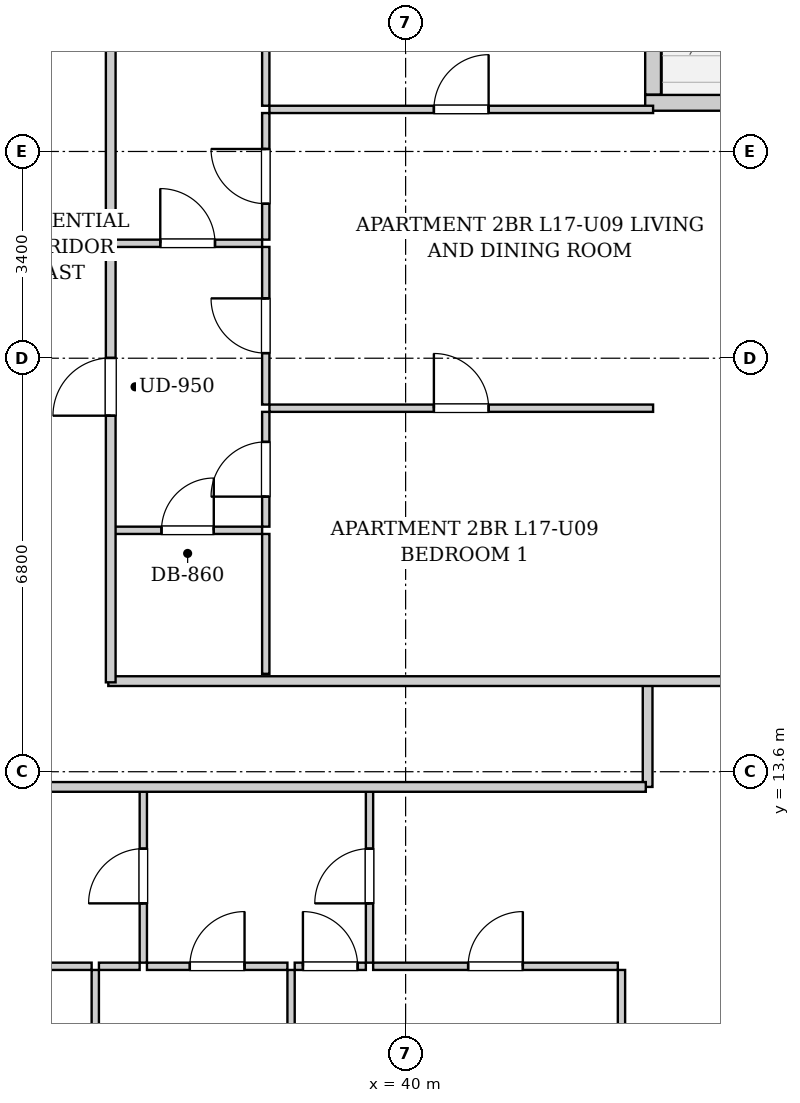
"""IFC4 building model, lengths in metres.
Left out: names, types, materials, properties, quantities, classifications, styles, units other than length and angle.
Written with IfcOpenShell. Run it as: python <this file> out.ifc"""

import sys

from ifc_helpers import new_model, si_unit, direction, frame, frame_2d, origin, place, context, subcontext, project, spatial, rectangle, extrude, element, fill, save


model = new_model("IFC4")
c1 = context("Model", 3, precision=1e-05, world=origin(), true_north=direction((0.0, 1.0)))
c2 = subcontext(c1, "Body", "Model", "MODEL_VIEW")
j1 = project(units=[si_unit("LENGTHUNIT", "METRE"), si_unit("PLANEANGLEUNIT", "RADIAN")], contexts=[c1])
p1 = place(None, origin())
s1 = spatial("IfcSite", under=j1, at=p1, CompositionType="ELEMENT")
p2 = place(p1, origin())
s2 = spatial("IfcBuilding", under=s1, at=p2, CompositionType="ELEMENT")
p3 = place(p2, frame((0.0, 0.0, 64.2)))
s3 = spatial("IfcBuildingStorey", under=s2, at=p3, CompositionType="ELEMENT", Elevation=64.2)
p4 = place(p3, frame((44.07, 28.066, 0.0), z_axis=(0.0, 0.0, 1.0), x_axis=(0.0, -1.0, 0.0)))
e1 = element("IfcWall", 1, at=p4, inside=s3, PredefinedType="SOLIDWALL", context=c2, shape_type="SweptSolid", body=[
    extrude(rectangle(XDim=3.332, YDim=0.26, at=frame_2d((1.666, 0.0))), origin(), (0.0, 0.0, 1.0), 2.94),
])
p5 = place(p4, frame((1.116, 0.0, 0.0)))
e2 = element("IfcOpeningElement", 2, at=p5, cuts=e1, PredefinedType="OPENING", context=c2, shape_type="SweptSolid", body=[
    extrude(rectangle(XDim=1.1, YDim=2.0, at=frame_2d((0.55, 1.0))), frame((0.0, 0.14, 0.0), z_axis=(0.0, -1.0, 0.0), x_axis=(1.0, 0.0, 0.0)), (0.0, 0.0, 1.0), 0.28),
])
p6 = place(p4, frame((0.276, 0.0, 0.55)))
e3 = element("IfcOpeningElement", 3, at=p6, cuts=e1, PredefinedType="OPENING", context=c2, shape_type="SweptSolid", body=[
    extrude(rectangle(XDim=0.68, YDim=1.2, at=frame_2d((0.34, 0.6))), frame((0.0, 0.14, 0.0), z_axis=(0.0, -1.0, 0.0), x_axis=(1.0, 0.0, 0.0)), (0.0, 0.0, 1.0), 0.28),
])
p7 = place(p3, frame((43.94, 24.6, 0.0), z_axis=(0.0, 0.0, 1.0), x_axis=(1.0, 0.0, 0.0)))
e4 = element("IfcWall", 4, at=p7, inside=s3, PredefinedType="SOLIDWALL", context=c2, shape_type="SweptSolid", body=[
    extrude(rectangle(XDim=2.4, YDim=0.26, at=frame_2d((1.2, 0.0))), origin(), (0.0, 0.0, 1.0), 2.94),
])
p8 = place(p3, frame((43.98, 13.35, 0.0), z_axis=(0.0, 0.0, 1.0), x_axis=(0.0, 1.0, 0.0)))
e5 = element("IfcWall", 5, at=p8, inside=s3, PredefinedType="PARTITIONING", context=c2, shape_type="SweptSolid", body=[
    extrude(rectangle(XDim=1.74, YDim=0.16, at=frame_2d((0.87, 0.0))), origin(), (0.0, 0.0, 1.0), 2.94),
])
p9 = place(p3, frame((35.11, 15.09, 0.0), z_axis=(0.0, 0.0, 1.0), x_axis=(1.0, 0.0, 0.0)))
e6 = element("IfcWall", 6, at=p9, inside=s3, PredefinedType="PARTITIONING", context=c2, shape_type="SweptSolid", body=[
    extrude(rectangle(XDim=11.11, YDim=0.16, at=frame_2d((5.555, 0.0))), origin(), (0.0, 0.0, 1.0), 2.232),
])
p10 = place(p3, frame((35.686, 10.46, 0.0), z_axis=(0.0, 0.0, 1.0), x_axis=(0.0, 1.0, 0.0)))
e7 = element("IfcWall", 7, at=p10, inside=s3, PredefinedType="PARTITIONING", context=c2, shape_type="SweptSolid", body=[
    extrude(rectangle(XDim=2.85, YDim=0.12, at=frame_2d((1.425, 0.0))), origin(), (0.0, 0.0, 1.0), 2.94),
])
p11 = place(p10, frame((0.975, 0.0, 0.0)))
e8 = element("IfcOpeningElement", 8, at=p11, cuts=e7, PredefinedType="OPENING", context=c2, shape_type="SweptSolid", body=[
    extrude(rectangle(XDim=0.9, YDim=2.05, at=frame_2d((0.45, 1.025))), frame((0.0, 0.07, 0.0), z_axis=(0.0, -1.0, 0.0), x_axis=(1.0, 0.0, 0.0)), (0.0, 0.0, 1.0), 0.14),
])
p12 = place(p3, frame((32.476, 10.4, 0.0), z_axis=(0.0, 0.0, 1.0), x_axis=(1.0, 0.0, 0.0)))
e9 = element("IfcWall", 9, at=p12, inside=s3, PredefinedType="PARTITIONING", context=c2, shape_type="SweptSolid", body=[
    extrude(rectangle(XDim=2.36, YDim=0.12, at=frame_2d((1.18, 0.0))), origin(), (0.0, 0.0, 1.0), 2.94),
])
p13 = place(p12, frame((0.73, 0.0, 0.0)))
e10 = element("IfcOpeningElement", 10, at=p13, cuts=e9, PredefinedType="OPENING", context=c2, shape_type="SweptSolid", body=[
    extrude(rectangle(XDim=0.9, YDim=2.05, at=frame_2d((0.45, 1.025))), frame((0.0, 0.07, 0.0), z_axis=(0.0, -1.0, 0.0), x_axis=(1.0, 0.0, 0.0)), (0.0, 0.0, 1.0), 0.14),
])
p14 = place(p3, frame((34.956, 10.4, 0.0), z_axis=(0.0, 0.0, 1.0), x_axis=(1.0, 0.0, 0.0)))
e11 = element("IfcWall", 11, at=p14, inside=s3, PredefinedType="PARTITIONING", context=c2, shape_type="SweptSolid", body=[
    extrude(rectangle(XDim=0.67, YDim=0.12, at=frame_2d((0.335, 0.0))), origin(), (0.0, 0.0, 1.0), 2.94),
])
p15 = place(p3, frame((39.406, 10.46, 0.0), z_axis=(0.0, 0.0, 1.0), x_axis=(0.0, 1.0, 0.0)))
e12 = element("IfcWall", 12, at=p15, inside=s3, PredefinedType="PARTITIONING", context=c2, shape_type="SweptSolid", body=[
    extrude(rectangle(XDim=2.85, YDim=0.12, at=frame_2d((1.425, 0.0))), origin(), (0.0, 0.0, 1.0), 2.94),
])
p16 = place(p15, frame((0.975, 0.0, 0.0)))
e13 = element("IfcOpeningElement", 13, at=p16, cuts=e12, PredefinedType="OPENING", context=c2, shape_type="SweptSolid", body=[
    extrude(rectangle(XDim=0.9, YDim=2.05, at=frame_2d((0.45, 1.025))), frame((0.0, 0.07, 0.0), z_axis=(0.0, -1.0, 0.0), x_axis=(1.0, 0.0, 0.0)), (0.0, 0.0, 1.0), 0.14),
])
p17 = place(p3, frame((35.746, 10.4, 0.0), z_axis=(0.0, 0.0, 1.0), x_axis=(1.0, 0.0, 0.0)))
e14 = element("IfcWall", 14, at=p17, inside=s3, PredefinedType="PARTITIONING", context=c2, shape_type="SweptSolid", body=[
    extrude(rectangle(XDim=2.31, YDim=0.12, at=frame_2d((1.155, 0.0))), origin(), (0.0, 0.0, 1.0), 2.94),
])
p18 = place(p17, frame((0.705, 0.0, 0.0)))
e15 = element("IfcOpeningElement", 15, at=p18, cuts=e14, PredefinedType="OPENING", context=c2, shape_type="SweptSolid", body=[
    extrude(rectangle(XDim=0.9, YDim=2.05, at=frame_2d((0.45, 1.025))), frame((0.0, 0.07, 0.0), z_axis=(0.0, -1.0, 0.0), x_axis=(1.0, 0.0, 0.0)), (0.0, 0.0, 1.0), 0.14),
])
p19 = place(p3, frame((38.176, 10.4, 0.0), z_axis=(0.0, 0.0, 1.0), x_axis=(1.0, 0.0, 0.0)))
e16 = element("IfcWall", 16, at=p19, inside=s3, PredefinedType="PARTITIONING", context=c2, shape_type="SweptSolid", body=[
    extrude(rectangle(XDim=1.17, YDim=0.12, at=frame_2d((0.585, 0.0))), origin(), (0.0, 0.0, 1.0), 2.94),
])
p20 = place(p19, frame((0.135, 0.0, 0.0)))
e17 = element("IfcOpeningElement", 17, at=p20, cuts=e16, PredefinedType="OPENING", context=c2, shape_type="SweptSolid", body=[
    extrude(rectangle(XDim=0.9, YDim=2.05, at=frame_2d((0.45, 1.025))), frame((0.0, 0.07, 0.0), z_axis=(0.0, -1.0, 0.0), x_axis=(1.0, 0.0, 0.0)), (0.0, 0.0, 1.0), 0.14),
])
p21 = place(p3, frame((39.466, 10.4, 0.0), z_axis=(0.0, 0.0, 1.0), x_axis=(1.0, 0.0, 0.0)))
e18 = element("IfcWall", 18, at=p21, inside=s3, PredefinedType="PARTITIONING", context=c2, shape_type="SweptSolid", body=[
    extrude(rectangle(XDim=4.024, YDim=0.12, at=frame_2d((2.012, 0.0))), origin(), (0.0, 0.0, 1.0), 2.94),
])
p22 = place(p21, frame((1.562, 0.0, 0.0)))
e19 = element("IfcOpeningElement", 19, at=p22, cuts=e18, PredefinedType="OPENING", context=c2, shape_type="SweptSolid", body=[
    extrude(rectangle(XDim=0.9, YDim=2.05, at=frame_2d((0.45, 1.025))), frame((0.0, 0.07, 0.0), z_axis=(0.0, -1.0, 0.0), x_axis=(1.0, 0.0, 0.0)), (0.0, 0.0, 1.0), 0.14),
])
p23 = place(p3, frame((34.896, 0.28, 0.0), z_axis=(0.0, 0.0, 1.0), x_axis=(0.0, 1.0, 0.0)))
e20 = element("IfcWall", 20, at=p23, inside=s3, PredefinedType="PARTITIONING", context=c2, shape_type="SweptSolid", body=[
    extrude(rectangle(XDim=10.06, YDim=0.12, at=frame_2d((5.03, 0.0))), origin(), (0.0, 0.0, 1.0), 2.94),
])
p24 = place(p23, frame((4.565, 0.0, 0.0)))
e21 = element("IfcOpeningElement", 21, at=p24, cuts=e20, PredefinedType="OPENING", context=c2, shape_type="SweptSolid", body=[
    extrude(rectangle(XDim=0.9, YDim=2.05, at=frame_2d((0.45, 1.025))), frame((0.0, 0.07, 0.0), z_axis=(0.0, -1.0, 0.0), x_axis=(1.0, 0.0, 0.0)), (0.0, 0.0, 1.0), 0.14),
])
p25 = place(p3, frame((38.116, 0.28, 0.0), z_axis=(0.0, 0.0, 1.0), x_axis=(0.0, 1.0, 0.0)))
e22 = element("IfcWall", 22, at=p25, inside=s3, PredefinedType="PARTITIONING", context=c2, shape_type="SweptSolid", body=[
    extrude(rectangle(XDim=10.06, YDim=0.12, at=frame_2d((5.03, 0.0))), origin(), (0.0, 0.0, 1.0), 2.94),
])
p26 = place(p25, frame((4.565, 0.0, 0.0)))
e23 = element("IfcOpeningElement", 23, at=p26, cuts=e22, PredefinedType="OPENING", context=c2, shape_type="SweptSolid", body=[
    extrude(rectangle(XDim=0.9, YDim=2.05, at=frame_2d((0.45, 1.025))), frame((0.0, 0.07, 0.0), z_axis=(0.0, -1.0, 0.0), x_axis=(1.0, 0.0, 0.0)), (0.0, 0.0, 1.0), 0.14),
])
p27 = place(p3, frame((43.55, 0.28, 0.0), z_axis=(0.0, 0.0, 1.0), x_axis=(0.0, 1.0, 0.0)))
e24 = element("IfcWall", 24, at=p27, inside=s3, PredefinedType="PARTITIONING", context=c2, shape_type="SweptSolid", body=[
    extrude(rectangle(XDim=10.06, YDim=0.12, at=frame_2d((5.03, 0.0))), origin(), (0.0, 0.0, 1.0), 2.94),
])
p28 = place(p27, frame((4.565, 0.0, 0.0)))
e25 = element("IfcOpeningElement", 25, at=p28, cuts=e24, PredefinedType="OPENING", context=c2, shape_type="SweptSolid", body=[
    extrude(rectangle(XDim=0.9, YDim=2.05, at=frame_2d((0.45, 1.025))), frame((0.0, 0.07, 0.0), z_axis=(0.0, -1.0, 0.0), x_axis=(1.0, 0.0, 0.0)), (0.0, 0.0, 1.0), 0.14),
])
p29 = place(p3, frame((35.19, 22.29, 0.0), z_axis=(0.0, 0.0, 1.0), x_axis=(1.0, 0.0, 0.0)))
e26 = element("IfcWall", 26, at=p29, inside=s3, PredefinedType="PARTITIONING", context=c2, shape_type="SweptSolid", body=[
    extrude(rectangle(XDim=2.45, YDim=0.12, at=frame_2d((1.225, 0.0))), origin(), (0.0, 0.0, 1.0), 2.94),
])
p30 = place(p29, frame((0.775, 0.0, 0.0)))
e27 = element("IfcOpeningElement", 27, at=p30, cuts=e26, PredefinedType="OPENING", context=c2, shape_type="SweptSolid", body=[
    extrude(rectangle(XDim=0.9, YDim=2.05, at=frame_2d((0.45, 1.025))), frame((0.0, 0.07, 0.0), z_axis=(0.0, -1.0, 0.0), x_axis=(1.0, 0.0, 0.0)), (0.0, 0.0, 1.0), 0.14),
])
p31 = place(p3, frame((37.7, 22.35, 0.0), z_axis=(0.0, 0.0, 1.0), x_axis=(0.0, 1.0, 0.0)))
e28 = element("IfcWall", 28, at=p31, inside=s3, PredefinedType="PARTITIONING", context=c2, shape_type="SweptSolid", body=[
    extrude(rectangle(XDim=2.082, YDim=0.12, at=frame_2d((1.041, 0.0))), origin(), (0.0, 0.0, 1.0), 2.94),
])
p32 = place(p31, frame((0.591, 0.0, 0.0)))
e29 = element("IfcOpeningElement", 29, at=p32, cuts=e28, PredefinedType="OPENING", context=c2, shape_type="SweptSolid", body=[
    extrude(rectangle(XDim=0.9, YDim=2.05, at=frame_2d((0.45, 1.025))), frame((0.0, 0.07, 0.0), z_axis=(0.0, -1.0, 0.0), x_axis=(1.0, 0.0, 0.0)), (0.0, 0.0, 1.0), 0.14),
])
p33 = place(p3, frame((37.7, 24.552, 0.0), z_axis=(0.0, 0.0, 1.0), x_axis=(0.0, 1.0, 0.0)))
e30 = element("IfcWall", 30, at=p33, inside=s3, PredefinedType="PARTITIONING", context=c2, shape_type="SweptSolid", body=[
    extrude(rectangle(XDim=4.308, YDim=0.12, at=frame_2d((2.154, 0.0))), origin(), (0.0, 0.0, 1.0), 2.94),
])
p34 = place(p33, frame((1.704, 0.0, 0.0)))
e31 = element("IfcOpeningElement", 31, at=p34, cuts=e30, PredefinedType="OPENING", context=c2, shape_type="SweptSolid", body=[
    extrude(rectangle(XDim=0.9, YDim=2.05, at=frame_2d((0.45, 1.025))), frame((0.0, 0.07, 0.0), z_axis=(0.0, -1.0, 0.0), x_axis=(1.0, 0.0, 0.0)), (0.0, 0.0, 1.0), 0.14),
])
p35 = place(p3, frame((35.19, 17.57, 0.0), z_axis=(0.0, 0.0, 1.0), x_axis=(1.0, 0.0, 0.0)))
e32 = element("IfcWall", 32, at=p35, inside=s3, PredefinedType="PARTITIONING", context=c2, shape_type="SweptSolid", body=[
    extrude(rectangle(XDim=2.45, YDim=0.12, at=frame_2d((1.225, 0.0))), origin(), (0.0, 0.0, 1.0), 2.94),
])
p36 = place(p35, frame((0.795, 0.0, 0.0)))
e33 = element("IfcOpeningElement", 33, at=p36, cuts=e32, PredefinedType="OPENING", context=c2, shape_type="SweptSolid", body=[
    extrude(rectangle(XDim=0.86, YDim=2.05, at=frame_2d((0.43, 1.025))), frame((0.0, 0.07, 0.0), z_axis=(0.0, -1.0, 0.0), x_axis=(1.0, 0.0, 0.0)), (0.0, 0.0, 1.0), 0.14),
])
p37 = place(p3, frame((37.7, 15.21, 0.0), z_axis=(0.0, 0.0, 1.0), x_axis=(0.0, 1.0, 0.0)))
e34 = element("IfcWall", 34, at=p37, inside=s3, PredefinedType="PARTITIONING", context=c2, shape_type="SweptSolid", body=[
    extrude(rectangle(XDim=2.3, YDim=0.12, at=frame_2d((1.15, 0.0))), origin(), (0.0, 0.0, 1.0), 2.94),
])
p38 = place(p3, frame((37.7, 17.63, 0.0), z_axis=(0.0, 0.0, 1.0), x_axis=(0.0, 1.0, 0.0)))
e35 = element("IfcWall", 35, at=p38, inside=s3, PredefinedType="PARTITIONING", context=c2, shape_type="SweptSolid", body=[
    extrude(rectangle(XDim=1.888, YDim=0.12, at=frame_2d((0.944, 0.0))), origin(), (0.0, 0.0, 1.0), 2.94),
])
p39 = place(p38, frame((0.494, 0.0, 0.0)))
e36 = element("IfcOpeningElement", 36, at=p39, cuts=e35, PredefinedType="OPENING", context=c2, shape_type="SweptSolid", body=[
    extrude(rectangle(XDim=0.9, YDim=2.05, at=frame_2d((0.45, 1.025))), frame((0.0, 0.07, 0.0), z_axis=(0.0, -1.0, 0.0), x_axis=(1.0, 0.0, 0.0)), (0.0, 0.0, 1.0), 0.14),
])
p40 = place(p3, frame((37.7, 19.638, 0.0), z_axis=(0.0, 0.0, 1.0), x_axis=(0.0, 1.0, 0.0)))
e37 = element("IfcWall", 37, at=p40, inside=s3, PredefinedType="PARTITIONING", context=c2, shape_type="SweptSolid", body=[
    extrude(rectangle(XDim=2.592, YDim=0.12, at=frame_2d((1.296, 0.0))), origin(), (0.0, 0.0, 1.0), 2.94),
])
p41 = place(p40, frame((0.846, 0.0, 0.0)))
e38 = element("IfcOpeningElement", 38, at=p41, cuts=e37, PredefinedType="OPENING", context=c2, shape_type="SweptSolid", body=[
    extrude(rectangle(XDim=0.9, YDim=2.05, at=frame_2d((0.45, 1.025))), frame((0.0, 0.07, 0.0), z_axis=(0.0, -1.0, 0.0), x_axis=(1.0, 0.0, 0.0)), (0.0, 0.0, 1.0), 0.14),
])
p42 = place(p3, frame((37.76, 19.578, 0.0), z_axis=(0.0, 0.0, 1.0), x_axis=(1.0, 0.0, 0.0)))
e39 = element("IfcWall", 39, at=p42, inside=s3, PredefinedType="PARTITIONING", context=c2, shape_type="SweptSolid", body=[
    extrude(rectangle(XDim=6.31, YDim=0.12, at=frame_2d((3.155, 0.0))), origin(), (0.0, 0.0, 1.0), 2.94),
])
p43 = place(p42, frame((2.705, 0.0, 0.0)))
e40 = element("IfcOpeningElement", 40, at=p43, cuts=e39, PredefinedType="OPENING", context=c2, shape_type="SweptSolid", body=[
    extrude(rectangle(XDim=0.9, YDim=2.05, at=frame_2d((0.45, 1.025))), frame((0.0, 0.07, 0.0), z_axis=(0.0, -1.0, 0.0), x_axis=(1.0, 0.0, 0.0)), (0.0, 0.0, 1.0), 0.14),
])
p44 = place(p3, frame((37.76, 24.492, 0.0), z_axis=(0.0, 0.0, 1.0), x_axis=(1.0, 0.0, 0.0)))
e41 = element("IfcWall", 41, at=p44, inside=s3, PredefinedType="PARTITIONING", context=c2, shape_type="SweptSolid", body=[
    extrude(rectangle(XDim=6.31, YDim=0.12, at=frame_2d((3.155, 0.0))), origin(), (0.0, 0.0, 1.0), 2.508),
])
p45 = place(p44, frame((2.705, 0.0, 0.0)))
e42 = element("IfcOpeningElement", 42, at=p45, cuts=e41, PredefinedType="OPENING", context=c2, shape_type="SweptSolid", body=[
    extrude(rectangle(XDim=0.9, YDim=2.05, at=frame_2d((0.45, 1.025))), frame((0.0, 0.07, 0.0), z_axis=(0.0, -1.0, 0.0), x_axis=(1.0, 0.0, 0.0)), (0.0, 0.0, 1.0), 0.14),
])
p46 = place(p3, frame((10.05, 13.35, 0.0), z_axis=(0.0, 0.0, 1.0), x_axis=(1.0, 0.0, 0.0)))
e43 = element("IfcWall", 43, at=p46, inside=s3, PredefinedType="PARTITIONING", context=c2, shape_type="SweptSolid", body=[
    extrude(rectangle(XDim=33.9, YDim=0.16, at=frame_2d((16.95, 0.0))), origin(), (0.0, 0.0, 1.0), 2.94),
])
p47 = place(p46, frame((3.8, 0.0, 0.0)))
e44 = element("IfcOpeningElement", 44, at=p47, cuts=e43, PredefinedType="OPENING", context=c2, shape_type="SweptSolid", body=[
    extrude(rectangle(XDim=0.95, YDim=2.1, at=frame_2d((0.475, 1.05))), frame((0.0, 0.09, 0.0), z_axis=(0.0, -1.0, 0.0), x_axis=(1.0, 0.0, 0.0)), (0.0, 0.0, 1.0), 0.18),
])
p48 = place(p46, frame((13.071, 0.0, 0.0)))
e45 = element("IfcOpeningElement", 45, at=p48, cuts=e43, PredefinedType="OPENING", context=c2, shape_type="SweptSolid", body=[
    extrude(rectangle(XDim=0.95, YDim=2.1, at=frame_2d((0.475, 1.05))), frame((0.0, 0.09, 0.0), z_axis=(0.0, -1.0, 0.0), x_axis=(1.0, 0.0, 0.0)), (0.0, 0.0, 1.0), 0.18),
])
p49 = place(p3, frame((35.15, 15.07, 0.0), z_axis=(0.0, 0.0, 1.0), x_axis=(0.0, 1.0, 0.0)))
e46 = element("IfcWall", 46, at=p49, inside=s3, PredefinedType="PARTITIONING", context=c2, shape_type="SweptSolid", body=[
    extrude(rectangle(XDim=13.93, YDim=0.16, at=frame_2d((6.965, 0.0))), origin(), (0.0, 0.0, 1.0), 2.94),
])
p50 = place(p49, frame((4.385, 0.0, 0.0)))
e47 = element("IfcOpeningElement", 47, at=p50, cuts=e46, PredefinedType="OPENING", context=c2, shape_type="SweptSolid", body=[
    extrude(rectangle(XDim=0.95, YDim=2.1, at=frame_2d((0.475, 1.05))), frame((0.0, 0.09, 0.0), z_axis=(0.0, -1.0, 0.0), x_axis=(1.0, 0.0, 0.0)), (0.0, 0.0, 1.0), 0.18),
])
p51 = place(p11, origin())
e48 = element("IfcDoor", 48, at=p51, inside=s3, OperationType="SINGLE_SWING_LEFT", PredefinedType="DOOR", context=c2, shape_type="SweptSolid", body=[
    extrude(rectangle(XDim=0.9, YDim=2.05, at=frame_2d((0.45, 1.025))), frame((0.0, 0.025, 0.0), z_axis=(0.0, -1.0, 0.0), x_axis=(1.0, 0.0, 0.0)), (0.0, 0.0, 1.0), 0.05),
])
fill(e8, e48)
p52 = place(p16, origin())
e49 = element("IfcDoor", 49, at=p52, inside=s3, OperationType="SINGLE_SWING_LEFT", PredefinedType="DOOR", context=c2, shape_type="SweptSolid", body=[
    extrude(rectangle(XDim=0.9, YDim=2.05, at=frame_2d((0.45, 1.025))), frame((0.0, 0.025, 0.0), z_axis=(0.0, -1.0, 0.0), x_axis=(1.0, 0.0, 0.0)), (0.0, 0.0, 1.0), 0.05),
])
fill(e13, e49)
p53 = place(p18, origin())
e50 = element("IfcDoor", 50, at=p53, inside=s3, OperationType="SINGLE_SWING_RIGHT", PredefinedType="DOOR", context=c2, shape_type="SweptSolid", body=[
    extrude(rectangle(XDim=0.9, YDim=2.05, at=frame_2d((0.45, 1.025))), frame((0.0, 0.025, 0.0), z_axis=(0.0, -1.0, 0.0), x_axis=(1.0, 0.0, 0.0)), (0.0, 0.0, 1.0), 0.05),
])
fill(e15, e50)
p54 = place(p20, origin())
e51 = element("IfcDoor", 51, at=p54, inside=s3, OperationType="SINGLE_SWING_LEFT", PredefinedType="DOOR", context=c2, shape_type="SweptSolid", body=[
    extrude(rectangle(XDim=0.9, YDim=2.05, at=frame_2d((0.45, 1.025))), frame((0.0, 0.025, 0.0), z_axis=(0.0, -1.0, 0.0), x_axis=(1.0, 0.0, 0.0)), (0.0, 0.0, 1.0), 0.05),
])
fill(e17, e51)
p55 = place(p22, origin())
e52 = element("IfcDoor", 52, at=p55, inside=s3, OperationType="SINGLE_SWING_RIGHT", PredefinedType="DOOR", context=c2, shape_type="SweptSolid", body=[
    extrude(rectangle(XDim=0.9, YDim=2.05, at=frame_2d((0.45, 1.025))), frame((0.0, 0.025, 0.0), z_axis=(0.0, -1.0, 0.0), x_axis=(1.0, 0.0, 0.0)), (0.0, 0.0, 1.0), 0.05),
])
fill(e19, e52)
p56 = place(p30, origin())
e53 = element("IfcDoor", 53, at=p56, inside=s3, OperationType="SINGLE_SWING_LEFT", PredefinedType="DOOR", context=c2, shape_type="SweptSolid", body=[
    extrude(rectangle(XDim=0.9, YDim=2.05, at=frame_2d((0.45, 1.025))), frame((0.0, 0.025, 0.0), z_axis=(0.0, -1.0, 0.0), x_axis=(1.0, 0.0, 0.0)), (0.0, 0.0, 1.0), 0.05),
])
fill(e27, e53)
p57 = place(p32, origin())
e54 = element("IfcDoor", 54, at=p57, inside=s3, OperationType="SINGLE_SWING_RIGHT", PredefinedType="DOOR", context=c2, shape_type="SweptSolid", body=[
    extrude(rectangle(XDim=0.9, YDim=2.05, at=frame_2d((0.45, 1.025))), frame((0.0, 0.025, 0.0), z_axis=(0.0, -1.0, 0.0), x_axis=(1.0, 0.0, 0.0)), (0.0, 0.0, 1.0), 0.05),
])
fill(e29, e54)
p58 = place(p36, origin())
e55 = element("IfcDoor", 55, at=p58, inside=s3, OperationType="SINGLE_SWING_RIGHT", PredefinedType="DOOR", context=c2, shape_type="SweptSolid", body=[
    extrude(rectangle(XDim=0.86, YDim=2.05, at=frame_2d((0.43, 1.025))), frame((0.0, 0.025, 0.0), z_axis=(0.0, -1.0, 0.0), x_axis=(1.0, 0.0, 0.0)), (0.0, 0.0, 1.0), 0.05),
])
fill(e33, e55)
p59 = place(p39, origin())
e56 = element("IfcDoor", 56, at=p59, inside=s3, OperationType="SINGLE_SWING_LEFT", PredefinedType="DOOR", context=c2, shape_type="SweptSolid", body=[
    extrude(rectangle(XDim=0.9, YDim=2.05, at=frame_2d((0.45, 1.025))), frame((0.0, 0.025, 0.0), z_axis=(0.0, -1.0, 0.0), x_axis=(1.0, 0.0, 0.0)), (0.0, 0.0, 1.0), 0.05),
])
fill(e36, e56)
p60 = place(p41, origin())
e57 = element("IfcDoor", 57, at=p60, inside=s3, OperationType="SINGLE_SWING_RIGHT", PredefinedType="DOOR", context=c2, shape_type="SweptSolid", body=[
    extrude(rectangle(XDim=0.9, YDim=2.05, at=frame_2d((0.45, 1.025))), frame((0.0, 0.025, 0.0), z_axis=(0.0, -1.0, 0.0), x_axis=(1.0, 0.0, 0.0)), (0.0, 0.0, 1.0), 0.05),
])
fill(e38, e57)
p61 = place(p43, origin())
e58 = element("IfcDoor", 58, at=p61, inside=s3, OperationType="SINGLE_SWING_LEFT", PredefinedType="DOOR", context=c2, shape_type="SweptSolid", body=[
    extrude(rectangle(XDim=0.9, YDim=2.05, at=frame_2d((0.45, 1.025))), frame((0.0, 0.025, 0.0), z_axis=(0.0, -1.0, 0.0), x_axis=(1.0, 0.0, 0.0)), (0.0, 0.0, 1.0), 0.05),
])
fill(e40, e58)
p62 = place(p45, origin())
e59 = element("IfcDoor", 59, at=p62, inside=s3, OperationType="SINGLE_SWING_RIGHT", PredefinedType="DOOR", context=c2, shape_type="SweptSolid", body=[
    extrude(rectangle(XDim=0.9, YDim=2.05, at=frame_2d((0.45, 1.025))), frame((0.0, 0.025, 0.0), z_axis=(0.0, -1.0, 0.0), x_axis=(1.0, 0.0, 0.0)), (0.0, 0.0, 1.0), 0.05),
])
fill(e42, e59)
p63 = place(p50, origin())
e60 = element("IfcDoor", 60, at=p63, inside=s3, OperationType="SINGLE_SWING_LEFT", PredefinedType="DOOR", context=c2, shape_type="SweptSolid", body=[
    extrude(rectangle(XDim=0.95, YDim=2.1, at=frame_2d((0.475, 1.05))), frame((0.0, 0.025, 0.0), z_axis=(0.0, -1.0, 0.0), x_axis=(1.0, 0.0, 0.0)), (0.0, 0.0, 1.0), 0.05),
])
fill(e47, e60)
save(model, sys.argv[1])
